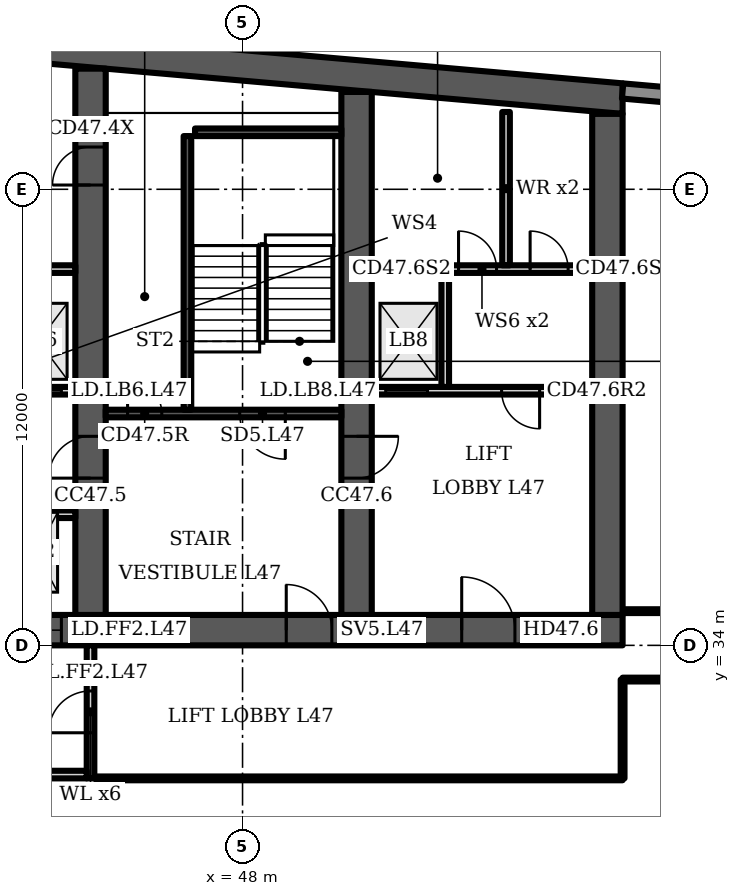
"""IFC4 building model, lengths in metres.
Left out: names, types, materials, properties, quantities, classifications, styles, units other than length and angle.
Written with IfcOpenShell. Run it as: python <this file> out.ifc"""

import sys

from ifc_helpers import new_model, si_unit, direction, frame, frame_2d, origin, place, context, subcontext, project, spatial, polyline, rectangle, outline, extrude, element, fill, save


model = new_model("IFC4")
c1 = context("Model", 3, precision=1e-05, world=origin(), true_north=direction((0.0, 1.0)))
c2 = subcontext(c1, "Body", "Model", "MODEL_VIEW")
j1 = project(units=[si_unit("LENGTHUNIT", "METRE"), si_unit("PLANEANGLEUNIT", "RADIAN")], contexts=[c1])
p1 = place(None, origin())
s1 = spatial("IfcSite", under=j1, at=p1, CompositionType="ELEMENT")
p2 = place(p1, origin())
s2 = spatial("IfcBuilding", under=s1, at=p2, CompositionType="ELEMENT")
p3 = place(p2, frame((0.0, 0.0, 191.5)))
s3 = spatial("IfcBuildingStorey", under=s2, at=p3, CompositionType="ELEMENT", Elevation=191.5)
p4 = place(p3, origin())
e1 = element("IfcWall", 1, at=p4, inside=s3, PredefinedType="SHEAR", context=c2, shape_type="SweptSolid", body=[
    extrude(outline(polyline([(16.0, 47.984), (37.0, 49.822), (58.0, 47.984), (58.0, 48.787), (37.0, 50.625), (16.0, 48.787), (16.0, 47.984)])), origin(), (0.0, 0.0, 1.0), 3.6),
])
p5 = place(p3, frame((16.0, 34.4, 0.0), z_axis=(0.0, 0.0, 1.0), x_axis=(1.0, 0.0, 0.0)))
e2 = element("IfcWall", 2, at=p5, inside=s3, PredefinedType="SHEAR", context=c2, shape_type="SweptSolid", body=[
    extrude(rectangle(XDim=42.0, YDim=0.8, at=frame_2d((21.0, 0.0))), origin(), (0.0, 0.0, 1.0), 3.6),
])
p6 = place(p5, frame((1.75, 0.0, 0.0)))
e3 = element("IfcOpeningElement", 3, at=p6, cuts=e2, PredefinedType="OPENING", context=c2, shape_type="SweptSolid", body=[
    extrude(rectangle(XDim=1.0, YDim=2.1, at=frame_2d((0.5, 1.05))), frame((0.0, 0.41, 0.0), z_axis=(0.0, -1.0, 0.0), x_axis=(1.0, 0.0, 0.0)), (0.0, 0.0, 1.0), 0.82),
])
p7 = place(p5, frame((4.65, 0.0, 0.0)))
e4 = element("IfcOpeningElement", 4, at=p7, cuts=e2, PredefinedType="OPENING", context=c2, shape_type="SweptSolid", body=[
    extrude(rectangle(XDim=1.0, YDim=2.1, at=frame_2d((0.5, 1.05))), frame((0.0, 0.41, 0.0), z_axis=(0.0, -1.0, 0.0), x_axis=(1.0, 0.0, 0.0)), (0.0, 0.0, 1.0), 0.82),
])
p8 = place(p5, frame((7.65, 0.0, 0.0)))
e5 = element("IfcOpeningElement", 5, at=p8, cuts=e2, PredefinedType="OPENING", context=c2, shape_type="SweptSolid", body=[
    extrude(rectangle(XDim=1.2, YDim=2.1, at=frame_2d((0.6, 1.05))), frame((0.0, 0.41, 0.0), z_axis=(0.0, -1.0, 0.0), x_axis=(1.0, 0.0, 0.0)), (0.0, 0.0, 1.0), 0.82),
])
p9 = place(p5, frame((14.767, 0.0, 0.0)))
e6 = element("IfcOpeningElement", 6, at=p9, cuts=e2, PredefinedType="OPENING", context=c2, shape_type="SweptSolid", body=[
    extrude(rectangle(XDim=1.1, YDim=2.1, at=frame_2d((0.55, 1.05))), frame((0.0, 0.41, 0.0), z_axis=(0.0, -1.0, 0.0), x_axis=(1.0, 0.0, 0.0)), (0.0, 0.0, 1.0), 0.82),
])
p10 = place(p5, frame((19.133, 0.0, 0.0)))
e7 = element("IfcOpeningElement", 7, at=p10, cuts=e2, PredefinedType="OPENING", context=c2, shape_type="SweptSolid", body=[
    extrude(rectangle(XDim=1.1, YDim=2.1, at=frame_2d((0.55, 1.05))), frame((0.0, 0.41, 0.0), z_axis=(0.0, -1.0, 0.0), x_axis=(1.0, 0.0, 0.0)), (0.0, 0.0, 1.0), 0.82),
])
p11 = place(p5, frame((16.8, 0.0, 0.0)))
e8 = element("IfcOpeningElement", 8, at=p11, cuts=e2, PredefinedType="OPENING", context=c2, shape_type="SweptSolid", body=[
    extrude(rectangle(XDim=1.4, YDim=2.1, at=frame_2d((0.7, 1.05))), frame((0.0, 0.41, 0.0), z_axis=(0.0, -1.0, 0.0), x_axis=(1.0, 0.0, 0.0)), (0.0, 0.0, 1.0), 0.82),
])
p12 = place(p5, frame((21.767, 0.0, 0.0)))
e9 = element("IfcOpeningElement", 9, at=p12, cuts=e2, PredefinedType="OPENING", context=c2, shape_type="SweptSolid", body=[
    extrude(rectangle(XDim=1.1, YDim=2.1, at=frame_2d((0.55, 1.05))), frame((0.0, 0.41, 0.0), z_axis=(0.0, -1.0, 0.0), x_axis=(1.0, 0.0, 0.0)), (0.0, 0.0, 1.0), 0.82),
])
p13 = place(p5, frame((23.95, 0.0, 0.0)))
e10 = element("IfcOpeningElement", 10, at=p13, cuts=e2, PredefinedType="OPENING", context=c2, shape_type="SweptSolid", body=[
    extrude(rectangle(XDim=1.1, YDim=2.1, at=frame_2d((0.55, 1.05))), frame((0.0, 0.41, 0.0), z_axis=(0.0, -1.0, 0.0), x_axis=(1.0, 0.0, 0.0)), (0.0, 0.0, 1.0), 0.82),
])
p14 = place(p5, frame((26.133, 0.0, 0.0)))
e11 = element("IfcOpeningElement", 11, at=p14, cuts=e2, PredefinedType="OPENING", context=c2, shape_type="SweptSolid", body=[
    extrude(rectangle(XDim=1.1, YDim=2.1, at=frame_2d((0.55, 1.05))), frame((0.0, 0.41, 0.0), z_axis=(0.0, -1.0, 0.0), x_axis=(1.0, 0.0, 0.0)), (0.0, 0.0, 1.0), 0.82),
])
p15 = place(p5, frame((33.15, 0.0, 0.0)))
e12 = element("IfcOpeningElement", 12, at=p15, cuts=e2, PredefinedType="OPENING", context=c2, shape_type="SweptSolid", body=[
    extrude(rectangle(XDim=1.2, YDim=2.1, at=frame_2d((0.6, 1.05))), frame((0.0, 0.41, 0.0), z_axis=(0.0, -1.0, 0.0), x_axis=(1.0, 0.0, 0.0)), (0.0, 0.0, 1.0), 0.82),
])
p16 = place(p5, frame((37.767, 0.0, 0.0)))
e13 = element("IfcOpeningElement", 13, at=p16, cuts=e2, PredefinedType="OPENING", context=c2, shape_type="SweptSolid", body=[
    extrude(rectangle(XDim=1.4, YDim=2.1, at=frame_2d((0.7, 1.05))), frame((0.0, 0.41, 0.0), z_axis=(0.0, -1.0, 0.0), x_axis=(1.0, 0.0, 0.0)), (0.0, 0.0, 1.0), 0.82),
])
p17 = place(p3, frame((44.0, 34.8, 0.0), z_axis=(0.0, 0.0, 1.0), x_axis=(0.0, 1.0, 0.0)))
e14 = element("IfcWall", 14, at=p17, inside=s3, PredefinedType="SHEAR", context=c2, shape_type="SweptSolid", body=[
    extrude(rectangle(XDim=14.374, YDim=0.8, at=frame_2d((7.187, 0.0))), origin(), (0.0, 0.0, 1.0), 3.6),
])
p18 = place(p17, frame((11.312, 0.0, 0.0)))
e15 = element("IfcOpeningElement", 15, at=p18, cuts=e14, PredefinedType="OPENING", context=c2, shape_type="SweptSolid", body=[
    extrude(rectangle(XDim=1.0, YDim=2.1, at=frame_2d((0.5, 1.05))), frame((0.0, 0.41, 0.0), z_axis=(0.0, -1.0, 0.0), x_axis=(1.0, 0.0, 0.0)), (0.0, 0.0, 1.0), 0.82),
])
p19 = place(p17, frame((3.6, 0.0, 0.0)))
e16 = element("IfcOpeningElement", 16, at=p19, cuts=e14, PredefinedType="OPENING", context=c2, shape_type="SweptSolid", body=[
    extrude(rectangle(XDim=1.1, YDim=2.1, at=frame_2d((0.55, 1.05))), frame((0.0, 0.41, 0.0), z_axis=(0.0, -1.0, 0.0), x_axis=(1.0, 0.0, 0.0)), (0.0, 0.0, 1.0), 0.82),
])
p20 = place(p3, frame((51.0, 34.8, 0.0), z_axis=(0.0, 0.0, 1.0), x_axis=(0.0, 1.0, 0.0)))
e17 = element("IfcWall", 17, at=p20, inside=s3, PredefinedType="SHEAR", context=c2, shape_type="SweptSolid", body=[
    extrude(rectangle(XDim=13.762, YDim=0.8, at=frame_2d((6.881, 0.0))), origin(), (0.0, 0.0, 1.0), 3.6),
])
p21 = place(p20, frame((3.6, 0.0, 0.0)))
e18 = element("IfcOpeningElement", 18, at=p21, cuts=e17, PredefinedType="OPENING", context=c2, shape_type="SweptSolid", body=[
    extrude(rectangle(XDim=1.1, YDim=2.1, at=frame_2d((0.55, 1.05))), frame((0.0, 0.41, 0.0), z_axis=(0.0, -1.0, 0.0), x_axis=(1.0, 0.0, 0.0)), (0.0, 0.0, 1.0), 0.82),
])
p22 = place(p3, frame((57.6, 34.8, 0.0), z_axis=(0.0, 0.0, 1.0), x_axis=(0.0, 1.0, 0.0)))
e19 = element("IfcWall", 19, at=p22, inside=s3, PredefinedType="SHEAR", context=c2, shape_type="SweptSolid", body=[
    extrude(rectangle(XDim=13.184, YDim=0.8, at=frame_2d((6.592, 0.0))), origin(), (0.0, 0.0, 1.0), 3.6),
])
p23 = place(p3, frame((60.983, 48.326, 0.0), z_axis=(0.0, 0.0, 1.0), x_axis=(-0.996194, 0.087168, 0.0)))
e20 = element("IfcWall", 20, at=p23, inside=s3, PredefinedType="SOLIDWALL", context=c2, shape_type="SweptSolid", body=[
    extrude(rectangle(XDim=2.994, YDim=0.4, at=frame_2d((1.497, 0.0))), origin(), (0.0, 0.0, 1.0), 3.2),
])
p24 = place(p3, frame((37.4, 40.7, 0.0), z_axis=(0.0, 0.0, 1.0), x_axis=(1.0, 0.0, 0.0)))
e21 = element("IfcWall", 21, at=p24, inside=s3, PredefinedType="PARTITIONING", context=c2, shape_type="SweptSolid", body=[
    extrude(rectangle(XDim=6.2, YDim=0.2, at=frame_2d((3.1, 0.0))), origin(), (0.0, 0.0, 1.0), 3.2),
])
p25 = place(p24, frame((0.367, 0.0, 0.0)))
e22 = element("IfcOpeningElement", 22, at=p25, cuts=e21, PredefinedType="OPENING", context=c2, shape_type="SweptSolid", body=[
    extrude(rectangle(XDim=1.1, YDim=2.1, at=frame_2d((0.55, 1.05))), frame((0.0, 0.11, 0.0), z_axis=(0.0, -1.0, 0.0), x_axis=(1.0, 0.0, 0.0)), (0.0, 0.0, 1.0), 0.22),
])
p26 = place(p24, frame((2.55, 0.0, 0.0)))
e23 = element("IfcOpeningElement", 23, at=p26, cuts=e21, PredefinedType="OPENING", context=c2, shape_type="SweptSolid", body=[
    extrude(rectangle(XDim=1.1, YDim=2.1, at=frame_2d((0.55, 1.05))), frame((0.0, 0.11, 0.0), z_axis=(0.0, -1.0, 0.0), x_axis=(1.0, 0.0, 0.0)), (0.0, 0.0, 1.0), 0.22),
])
p27 = place(p24, frame((4.733, 0.0, 0.0)))
e24 = element("IfcOpeningElement", 24, at=p27, cuts=e21, PredefinedType="OPENING", context=c2, shape_type="SweptSolid", body=[
    extrude(rectangle(XDim=1.1, YDim=2.1, at=frame_2d((0.55, 1.05))), frame((0.0, 0.11, 0.0), z_axis=(0.0, -1.0, 0.0), x_axis=(1.0, 0.0, 0.0)), (0.0, 0.0, 1.0), 0.22),
])
p28 = place(p3, frame((0.0, 0.0, -0.0)))
e25 = element("IfcWall", 25, at=p28, inside=s3, PredefinedType="PARTITIONING", context=c2, shape_type="SweptSolid", body=[
    extrude(outline(polyline([(41.567, 37.1), (39.433, 37.1), (39.433, 34.8), (39.233, 34.8), (39.233, 37.65), (37.4, 37.65), (37.4, 37.85), (39.233, 37.85), (39.433, 37.85), (39.433, 37.3), (41.567, 37.3), (41.567, 37.55), (41.767, 37.55), (43.6, 37.55), (43.6, 37.35), (41.767, 37.35), (41.767, 34.8), (41.567, 34.8), (41.567, 37.1)])), origin(), (0.0, 0.0, 1.0), 3.2),
])
p29 = place(p3, frame((0.0, 0.0, -0.0)))
e26 = element("IfcWall", 26, at=p29, inside=s3, PredefinedType="PARTITIONING", context=c2, shape_type="SweptSolid", body=[
    extrude(outline(polyline([(39.433, 40.8), (39.233, 40.8), (39.233, 43.8), (37.4, 43.8), (37.4, 44.0), (43.6, 44.0), (43.6, 43.8), (41.767, 43.8), (41.767, 40.8), (41.567, 40.8), (41.567, 43.8), (39.433, 43.8), (39.433, 40.8)])), origin(), (0.0, 0.0, 1.0), 3.2),
])
p30 = place(p3, frame((44.4, 40.1, 0.0), z_axis=(0.0, 0.0, 1.0), x_axis=(1.0, 0.0, 0.0)))
e27 = element("IfcWall", 27, at=p30, inside=s3, PredefinedType="SHEAR", context=c2, shape_type="SweptSolid", body=[
    extrude(rectangle(XDim=6.2, YDim=0.2, at=frame_2d((3.1, 0.0))), origin(), (0.0, 0.0, 1.0), 3.2),
])
p31 = place(p30, frame((3.525, 0.0, 0.0)))
e28 = element("IfcOpeningElement", 28, at=p31, cuts=e27, PredefinedType="OPENING", context=c2, shape_type="SweptSolid", body=[
    extrude(rectangle(XDim=1.2, YDim=2.1, at=frame_2d((0.6, 1.05))), frame((0.0, 0.11, 0.0), z_axis=(0.0, -1.0, 0.0), x_axis=(1.0, 0.0, 0.0)), (0.0, 0.0, 1.0), 0.22),
])
p32 = place(p30, frame((0.575, 0.0, 0.0)))
e29 = element("IfcOpeningElement", 29, at=p32, cuts=e27, PredefinedType="OPENING", context=c2, shape_type="SweptSolid", body=[
    extrude(rectangle(XDim=0.9, YDim=2.1, at=frame_2d((0.45, 1.05))), frame((0.0, 0.11, 0.0), z_axis=(0.0, -1.0, 0.0), x_axis=(1.0, 0.0, 0.0)), (0.0, 0.0, 1.0), 0.22),
])
p33 = place(p3, frame((46.55, 40.2, 0.0), z_axis=(0.0, 0.0, 1.0), x_axis=(0.0, 1.0, 0.0)))
e30 = element("IfcWall", 30, at=p33, inside=s3, PredefinedType="SHEAR", context=c2, shape_type="SweptSolid", body=[
    extrude(rectangle(XDim=7.2, YDim=0.2, at=frame_2d((3.6, 0.0))), origin(), (0.0, 0.0, 1.0), 3.2),
])
p34 = place(p3, frame((46.75, 47.5, 0.0), z_axis=(0.0, 0.0, 1.0), x_axis=(1.0, 0.0, 0.0)))
e31 = element("IfcWall", 31, at=p34, inside=s3, PredefinedType="SHEAR", context=c2, shape_type="SweptSolid", body=[
    extrude(rectangle(XDim=3.85, YDim=0.2, at=frame_2d((1.925, 0.0))), origin(), (0.0, 0.0, 1.0), 3.2),
])
p35 = place(p3, frame((51.4, 40.7, 0.0), z_axis=(0.0, 0.0, 1.0), x_axis=(1.0, 0.0, 0.0)))
e32 = element("IfcWall", 32, at=p35, inside=s3, PredefinedType="PARTITIONING", context=c2, shape_type="SweptSolid", body=[
    extrude(rectangle(XDim=5.8, YDim=0.2, at=frame_2d((2.9, 0.0))), origin(), (0.0, 0.0, 1.0), 3.2),
])
p36 = place(p35, frame((0.367, 0.0, 0.0)))
e33 = element("IfcOpeningElement", 33, at=p36, cuts=e32, PredefinedType="OPENING", context=c2, shape_type="SweptSolid", body=[
    extrude(rectangle(XDim=1.1, YDim=2.1, at=frame_2d((0.55, 1.05))), frame((0.0, 0.11, 0.0), z_axis=(0.0, -1.0, 0.0), x_axis=(1.0, 0.0, 0.0)), (0.0, 0.0, 1.0), 0.22),
])
p37 = place(p35, frame((3.417, 0.0, 0.0)))
e34 = element("IfcOpeningElement", 34, at=p37, cuts=e32, PredefinedType="OPENING", context=c2, shape_type="SweptSolid", body=[
    extrude(rectangle(XDim=1.0, YDim=2.1, at=frame_2d((0.5, 1.05))), frame((0.0, 0.11, 0.0), z_axis=(0.0, -1.0, 0.0), x_axis=(1.0, 0.0, 0.0)), (0.0, 0.0, 1.0), 0.22),
])
p38 = place(p3, frame((51.4, 43.9, 0.0), z_axis=(0.0, 0.0, 1.0), x_axis=(1.0, 0.0, 0.0)))
e35 = element("IfcWall", 35, at=p38, inside=s3, PredefinedType="PARTITIONING", context=c2, shape_type="SweptSolid", body=[
    extrude(rectangle(XDim=5.8, YDim=0.2, at=frame_2d((2.9, 0.0))), origin(), (0.0, 0.0, 1.0), 3.2),
])
p39 = place(p38, frame((2.283, 0.0, 0.0)))
e36 = element("IfcOpeningElement", 36, at=p39, cuts=e35, PredefinedType="OPENING", context=c2, shape_type="SweptSolid", body=[
    extrude(rectangle(XDim=1.0, YDim=2.1, at=frame_2d((0.5, 1.05))), frame((0.0, 0.11, 0.0), z_axis=(0.0, -1.0, 0.0), x_axis=(1.0, 0.0, 0.0)), (0.0, 0.0, 1.0), 0.22),
])
p40 = place(p38, frame((4.167, 0.0, 0.0)))
e37 = element("IfcOpeningElement", 37, at=p40, cuts=e35, PredefinedType="OPENING", context=c2, shape_type="SweptSolid", body=[
    extrude(rectangle(XDim=1.0, YDim=2.1, at=frame_2d((0.5, 1.05))), frame((0.0, 0.11, 0.0), z_axis=(0.0, -1.0, 0.0), x_axis=(1.0, 0.0, 0.0)), (0.0, 0.0, 1.0), 0.22),
])
p41 = place(p3, frame((0.0, 0.0, -0.0)))
e38 = element("IfcWall", 38, at=p41, inside=s3, PredefinedType="PARTITIONING", context=c2, shape_type="SweptSolid", body=[
    extrude(outline(polyline([(53.433, 40.8), (53.433, 43.8), (53.233, 43.8), (53.233, 40.8), (53.433, 40.8)])), origin(), (0.0, 0.0, 1.0), 3.2),
])
p42 = place(p3, frame((54.933, 44.0, 0.0), z_axis=(0.0, 0.0, 1.0), x_axis=(0.0, 1.0, 0.0)))
e39 = element("IfcWall", 39, at=p42, inside=s3, PredefinedType="PARTITIONING", context=c2, shape_type="SweptSolid", body=[
    extrude(rectangle(XDim=4.034, YDim=0.2, at=frame_2d((2.017, 0.0))), origin(), (0.0, 0.0, 1.0), 3.2),
])
p43 = place(p3, frame((44.0, 30.5, 0.0), z_axis=(0.0, 0.0, 1.0), x_axis=(0.0, 1.0, 0.0)))
e40 = element("IfcWall", 40, at=p43, inside=s3, PredefinedType="PARTITIONING", context=c2, shape_type="SweptSolid", body=[
    extrude(rectangle(XDim=3.5, YDim=0.2, at=frame_2d((1.75, 0.0))), origin(), (0.0, 0.0, 1.0), 3.2),
])
p44 = place(p43, frame((1.2, 0.0, 0.0)))
e41 = element("IfcOpeningElement", 41, at=p44, cuts=e40, PredefinedType="OPENING", context=c2, shape_type="SweptSolid", body=[
    extrude(rectangle(XDim=1.1, YDim=2.1, at=frame_2d((0.55, 1.05))), frame((0.0, 0.11, 0.0), z_axis=(0.0, -1.0, 0.0), x_axis=(1.0, 0.0, 0.0)), (0.0, 0.0, 1.0), 0.22),
])
p45 = place(p3, frame((41.1, 30.6, 0.0), z_axis=(0.0, 0.0, 1.0), x_axis=(1.0, 0.0, 0.0)))
e42 = element("IfcWall", 42, at=p45, inside=s3, PredefinedType="PARTITIONING", context=c2, shape_type="SweptSolid", body=[
    extrude(rectangle(XDim=2.8, YDim=0.2, at=frame_2d((1.4, 0.0))), origin(), (0.0, 0.0, 1.0), 3.2),
])
p46 = place(p3, frame((58.0, 30.5, 0.0), z_axis=(0.0, 0.0, 1.0), x_axis=(0.0, 1.0, 0.0)))
e43 = element("IfcWall", 43, at=p46, inside=s3, PredefinedType="PARTITIONING", context=c2, shape_type="SweptSolid", body=[
    extrude(rectangle(XDim=2.6, YDim=0.1, at=frame_2d((1.3, 0.0))), origin(), (0.0, 0.0, 1.0), 3.2),
])
p47 = place(p3, frame((58.0, 33.1, 0.0), z_axis=(0.0, 0.0, 1.0), x_axis=(1.0, 0.0, 0.0)))
e44 = element("IfcWall", 44, at=p47, inside=s3, PredefinedType="PARTITIONING", context=c2, shape_type="SweptSolid", body=[
    extrude(rectangle(XDim=1.5, YDim=0.1, at=frame_2d((0.75, 0.0))), origin(), (0.0, 0.0, 1.0), 3.2),
])
p48 = place(p3, frame((58.02, 34.9, 0.0), z_axis=(0.0, 0.0, 1.0), x_axis=(1.0, 0.0, 0.0)))
e45 = element("IfcWall", 45, at=p48, inside=s3, PredefinedType="PARTITIONING", context=c2, shape_type="SweptSolid", body=[
    extrude(rectangle(XDim=1.48, YDim=0.1, at=frame_2d((0.74, 0.0))), origin(), (0.0, 0.0, 1.0), 3.2),
])
p49 = place(p3, frame((44.15, 30.5, 0.0), z_axis=(0.0, 0.0, 1.0), x_axis=(1.0, 0.0, 0.0)))
e46 = element("IfcWall", 46, at=p49, inside=s3, PredefinedType="PARTITIONING", context=c2, shape_type="SweptSolid", body=[
    extrude(rectangle(XDim=13.85, YDim=0.1, at=frame_2d((6.925, 0.0))), origin(), (0.0, 0.0, 1.0), 3.2),
])
p50 = place(p14, origin())
e47 = element("IfcDoor", 47, at=p50, inside=s3, OperationType="DOUBLE_DOOR_SLIDING", PredefinedType="DOOR", context=c2, shape_type="SweptSolid", body=[
    extrude(rectangle(XDim=1.1, YDim=2.1, at=frame_2d((0.55, 1.05))), frame((0.0, 0.025, 0.0), z_axis=(0.0, -1.0, 0.0), x_axis=(1.0, 0.0, 0.0)), (0.0, 0.0, 1.0), 0.05),
])
fill(e11, e47)
p51 = place(p27, origin())
e48 = element("IfcDoor", 48, at=p51, inside=s3, OperationType="DOUBLE_DOOR_SLIDING", PredefinedType="DOOR", context=c2, shape_type="SweptSolid", body=[
    extrude(rectangle(XDim=1.1, YDim=2.1, at=frame_2d((0.55, 1.05))), frame((0.0, 0.025, 0.0), z_axis=(0.0, -1.0, 0.0), x_axis=(1.0, 0.0, 0.0)), (0.0, 0.0, 1.0), 0.05),
])
fill(e24, e48)
p52 = place(p18, origin())
e49 = element("IfcDoor", 49, at=p52, inside=s3, OperationType="SINGLE_SWING_LEFT", PredefinedType="DOOR", context=c2, shape_type="SweptSolid", body=[
    extrude(rectangle(XDim=1.0, YDim=2.1, at=frame_2d((0.5, 1.05))), frame((0.0, 0.4, 0.0), z_axis=(0.0, -1.0, 0.0), x_axis=(1.0, 0.0, 0.0)), (0.0, 0.0, 1.0), 0.8),
])
fill(e15, e49)
p53 = place(p31, origin())
e50 = element("IfcDoor", 50, at=p53, inside=s3, OperationType="SINGLE_SWING_RIGHT", PredefinedType="DOOR", context=c2, shape_type="SweptSolid", body=[
    extrude(rectangle(XDim=1.2, YDim=2.1, at=frame_2d((0.6, 1.05))), frame((0.0, 0.025, 0.0), z_axis=(0.0, -1.0, 0.0), x_axis=(1.0, 0.0, 0.0)), (0.0, 0.0, 1.0), 0.05),
])
fill(e28, e50)
p54 = place(p32, origin())
e51 = element("IfcDoor", 51, at=p54, inside=s3, OperationType="SINGLE_SWING_LEFT", PredefinedType="DOOR", context=c2, shape_type="SweptSolid", body=[
    extrude(rectangle(XDim=0.9, YDim=2.1, at=frame_2d((0.45, 1.05))), frame((0.0, 0.025, 0.0), z_axis=(0.0, -1.0, 0.0), x_axis=(1.0, 0.0, 0.0)), (0.0, 0.0, 1.0), 0.05),
])
fill(e29, e51)
p55 = place(p15, origin())
e52 = element("IfcDoor", 52, at=p55, inside=s3, OperationType="SINGLE_SWING_LEFT", PredefinedType="DOOR", context=c2, shape_type="SweptSolid", body=[
    extrude(rectangle(XDim=1.2, YDim=2.1, at=frame_2d((0.6, 1.05))), frame((0.0, 0.025, 0.0), z_axis=(0.0, -1.0, 0.0), x_axis=(1.0, 0.0, 0.0)), (0.0, 0.0, 1.0), 0.05),
])
fill(e12, e52)
p56 = place(p16, origin())
e53 = element("IfcDoor", 53, at=p56, inside=s3, OperationType="DOUBLE_DOOR_SINGLE_SWING", PredefinedType="DOOR", context=c2, shape_type="SweptSolid", body=[
    extrude(rectangle(XDim=1.4, YDim=2.1, at=frame_2d((0.7, 1.05))), frame((0.0, 0.025, 0.0), z_axis=(0.0, -1.0, 0.0), x_axis=(1.0, 0.0, 0.0)), (0.0, 0.0, 1.0), 0.05),
])
fill(e13, e53)
p57 = place(p36, origin())
e54 = element("IfcDoor", 54, at=p57, inside=s3, OperationType="DOUBLE_DOOR_SLIDING", PredefinedType="DOOR", context=c2, shape_type="SweptSolid", body=[
    extrude(rectangle(XDim=1.1, YDim=2.1, at=frame_2d((0.55, 1.05))), frame((0.0, 0.025, 0.0), z_axis=(0.0, -1.0, 0.0), x_axis=(1.0, 0.0, 0.0)), (0.0, 0.0, 1.0), 0.05),
])
fill(e33, e54)
p58 = place(p37, origin())
e55 = element("IfcDoor", 55, at=p58, inside=s3, OperationType="SINGLE_SWING_RIGHT", PredefinedType="DOOR", context=c2, shape_type="SweptSolid", body=[
    extrude(rectangle(XDim=1.0, YDim=2.1, at=frame_2d((0.5, 1.05))), frame((0.0, 0.025, 0.0), z_axis=(0.0, -1.0, 0.0), x_axis=(1.0, 0.0, 0.0)), (0.0, 0.0, 1.0), 0.05),
])
fill(e34, e55)
p59 = place(p39, origin())
e56 = element("IfcDoor", 56, at=p59, inside=s3, OperationType="SINGLE_SWING_LEFT", PredefinedType="DOOR", context=c2, shape_type="SweptSolid", body=[
    extrude(rectangle(XDim=1.0, YDim=2.1, at=frame_2d((0.5, 1.05))), frame((0.0, 0.025, 0.0), z_axis=(0.0, -1.0, 0.0), x_axis=(1.0, 0.0, 0.0)), (0.0, 0.0, 1.0), 0.05),
])
fill(e36, e56)
p60 = place(p40, origin())
e57 = element("IfcDoor", 57, at=p60, inside=s3, OperationType="SINGLE_SWING_LEFT", PredefinedType="DOOR", context=c2, shape_type="SweptSolid", body=[
    extrude(rectangle(XDim=1.0, YDim=2.1, at=frame_2d((0.5, 1.05))), frame((0.0, 0.025, 0.0), z_axis=(0.0, -1.0, 0.0), x_axis=(1.0, 0.0, 0.0)), (0.0, 0.0, 1.0), 0.05),
])
fill(e37, e57)
p61 = place(p19, origin())
e58 = element("IfcDoor", 58, at=p61, inside=s3, OperationType="SINGLE_SWING_LEFT", PredefinedType="DOOR", context=c2, shape_type="SweptSolid", body=[
    extrude(rectangle(XDim=1.1, YDim=2.1, at=frame_2d((0.55, 1.05))), frame((0.0, 0.025, 0.0), z_axis=(0.0, -1.0, 0.0), x_axis=(1.0, 0.0, 0.0)), (0.0, 0.0, 1.0), 0.05),
])
fill(e16, e58)
p62 = place(p21, origin())
e59 = element("IfcDoor", 59, at=p62, inside=s3, OperationType="SINGLE_SWING_RIGHT", PredefinedType="DOOR", context=c2, shape_type="SweptSolid", body=[
    extrude(rectangle(XDim=1.1, YDim=2.1, at=frame_2d((0.55, 1.05))), frame((0.0, 0.025, 0.0), z_axis=(0.0, -1.0, 0.0), x_axis=(1.0, 0.0, 0.0)), (0.0, 0.0, 1.0), 0.05),
])
fill(e18, e59)
p63 = place(p44, origin())
e60 = element("IfcDoor", 60, at=p63, inside=s3, OperationType="SINGLE_SWING_LEFT", PredefinedType="DOOR", context=c2, shape_type="SweptSolid", body=[
    extrude(rectangle(XDim=1.1, YDim=2.1, at=frame_2d((0.55, 1.05))), frame((0.0, 0.025, 0.0), z_axis=(0.0, -1.0, 0.0), x_axis=(1.0, 0.0, 0.0)), (0.0, 0.0, 1.0), 0.05),
])
fill(e41, e60)
save(model, sys.argv[1])
